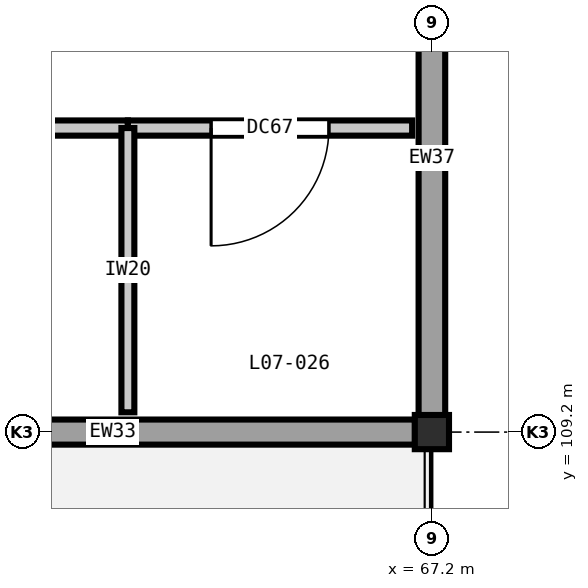
"""IFC4 building model, lengths in metres.
Left out: names, types, materials, properties, quantities, classifications, styles, units other than length and angle.
Written with IfcOpenShell. Run it as: python <this file> out.ifc"""

import sys

from ifc_helpers import new_model, si_unit, direction, frame, frame_2d, origin, origin_2d, place, context, subcontext, project, spatial, rectangle, extrude, element, fill, save


model = new_model("IFC4")
c1 = context("Model", 3, precision=1e-05, world=origin(), true_north=direction((0.0, 1.0)))
c2 = subcontext(c1, "Body", "Model", "MODEL_VIEW")
j1 = project(units=[si_unit("LENGTHUNIT", "METRE"), si_unit("PLANEANGLEUNIT", "RADIAN")], contexts=[c1])
p1 = place(None, origin())
s1 = spatial("IfcSite", under=j1, at=p1, CompositionType="ELEMENT")
p2 = place(p1, origin())
s2 = spatial("IfcBuilding", under=s1, at=p2, CompositionType="ELEMENT")
p3 = place(p2, frame((0.0, 0.0, 33.0)))
s3 = spatial("IfcBuildingStorey", under=s2, at=p3, CompositionType="ELEMENT", Elevation=33.0)
p4 = place(p3, frame((67.2, 109.2, 0.0), z_axis=(0.0, 0.0, 1.0), x_axis=(1.0, 0.0, 0.0)))
e1 = element("IfcColumn", 1, at=p4, inside=s3, PredefinedType="COLUMN", context=c2, shape_type="SweptSolid", body=[
    extrude(rectangle(XDim=0.45, YDim=0.45, at=origin_2d()), origin(), (0.0, 0.0, 1.0), 4.2),
])
p5 = place(p3, frame((67.2, 116.177, 0.0), z_axis=(0.0, 0.0, 1.0), x_axis=(0.0, -1.0, 0.0)))
e2 = element("IfcWall", 2, at=p5, inside=s3, PredefinedType="SOLIDWALL", context=c2, shape_type="SweptSolid", body=[
    extrude(rectangle(XDim=6.754, YDim=0.35, at=frame_2d((3.377, 0.0))), origin(), (0.0, 0.0, 1.0), 3.48),
])
p6 = place(p3, frame((66.977, 109.2, 0.0), z_axis=(0.0, 0.0, 1.0), x_axis=(-1.0, 0.0, 0.0)))
e3 = element("IfcWall", 3, at=p6, inside=s3, PredefinedType="SOLIDWALL", context=c2, shape_type="SweptSolid", body=[
    extrude(rectangle(XDim=7.954, YDim=0.33, at=frame_2d((3.977, 0.0))), origin(), (0.0, 0.0, 1.0), 3.48),
])
p7 = place(p3, frame((56.0, 113.2, 0.0), z_axis=(0.0, 0.0, 1.0), x_axis=(1.0, 0.0, 0.0)))
e4 = element("IfcWall", 4, at=p7, inside=s3, PredefinedType="PARTITIONING", context=c2, shape_type="SweptSolid", body=[
    extrude(rectangle(XDim=7.2, YDim=0.2, at=frame_2d((3.6, 0.0))), origin(), (0.0, 0.0, 1.0), 3.92),
])
p8 = place(p7, frame((2.875, 0.0, 0.0)))
e5 = element("IfcOpeningElement", 5, at=p8, cuts=e4, PredefinedType="OPENING", context=c2, shape_type="SweptSolid", body=[
    extrude(rectangle(XDim=1.45, YDim=2.25, at=frame_2d((0.725, 1.125))), frame((0.0, 0.11, 0.0), z_axis=(0.0, -1.0, 0.0), x_axis=(1.0, 0.0, 0.0)), (0.0, 0.0, 1.0), 0.22),
])
p9 = place(p3, frame((63.2, 113.2, 0.0), z_axis=(0.0, 0.0, 1.0), x_axis=(1.0, 0.0, 0.0)))
e6 = element("IfcWall", 6, at=p9, inside=s3, PredefinedType="PARTITIONING", context=c2, shape_type="SweptSolid", body=[
    extrude(rectangle(XDim=3.74, YDim=0.2, at=frame_2d((1.87, 0.0))), origin(), (0.0, 0.0, 1.0), 3.92),
])
p10 = place(p9, frame((1.095, 0.0, 0.0)))
e7 = element("IfcOpeningElement", 7, at=p10, cuts=e6, PredefinedType="OPENING", context=c2, shape_type="SweptSolid", body=[
    extrude(rectangle(XDim=1.55, YDim=2.25, at=frame_2d((0.775, 1.125))), frame((0.0, 0.11, 0.0), z_axis=(0.0, -1.0, 0.0), x_axis=(1.0, 0.0, 0.0)), (0.0, 0.0, 1.0), 0.22),
])
p11 = place(p3, frame((63.2, 109.46, 0.0), z_axis=(0.0, 0.0, 1.0), x_axis=(0.0, 1.0, 0.0)))
e8 = element("IfcWall", 8, at=p11, inside=s3, PredefinedType="PARTITIONING", context=c2, shape_type="SweptSolid", body=[
    extrude(rectangle(XDim=3.74, YDim=0.17, at=frame_2d((1.87, 0.0))), origin(), (0.0, 0.0, 1.0), 3.92),
])
p12 = place(p10, frame((1.55, 0.0, 0.0), z_axis=(0.0, 0.0, 1.0), x_axis=(-1.0, 0.0, 0.0)))
e9 = element("IfcDoor", 9, at=p12, inside=s3, OperationType="SINGLE_SWING_RIGHT", PredefinedType="DOOR", context=c2, shape_type="SweptSolid", body=[
    extrude(rectangle(XDim=1.55, YDim=2.25, at=frame_2d((0.775, 1.125))), frame((0.0, 0.025, 0.0), z_axis=(0.0, -1.0, 0.0), x_axis=(1.0, 0.0, 0.0)), (0.0, 0.0, 1.0), 0.05),
])
fill(e7, e9)
save(model, sys.argv[1])
